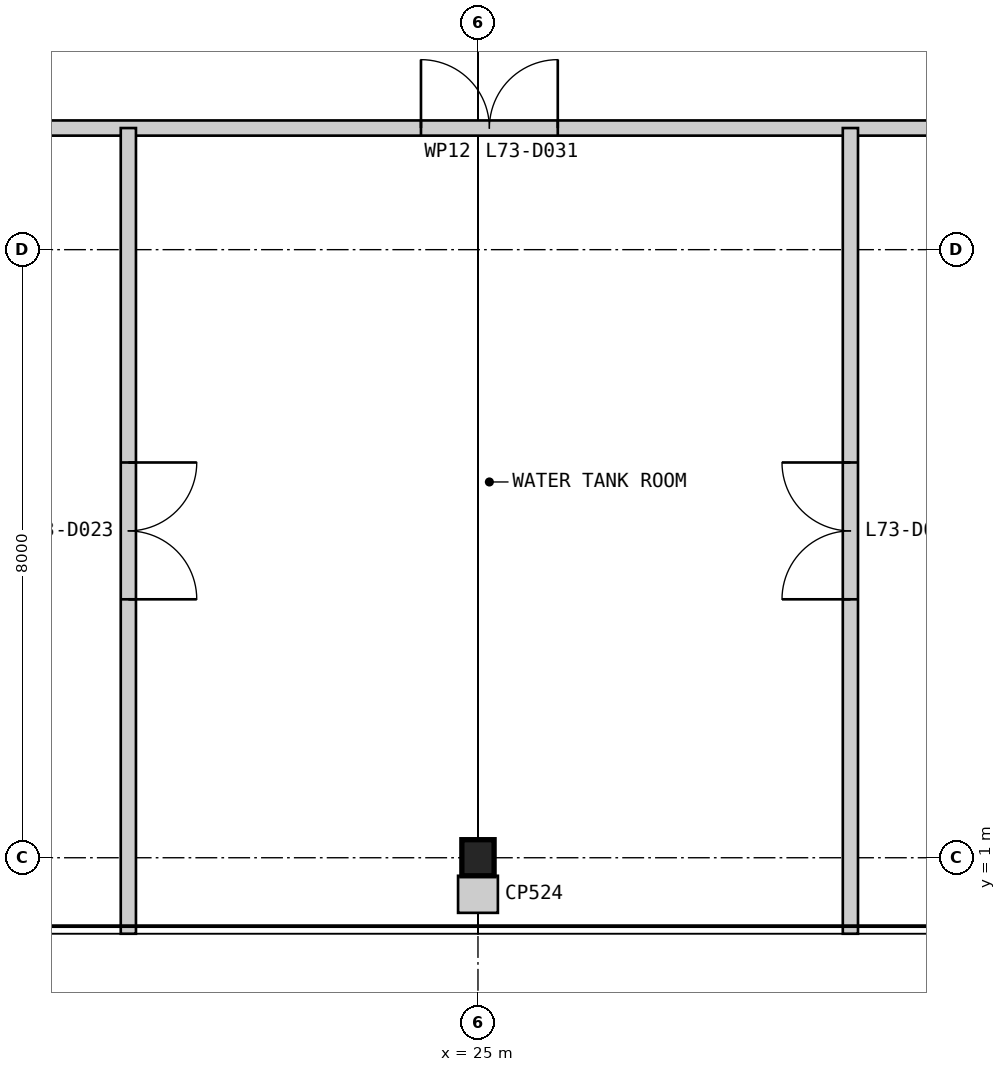
"""IFC4 building model, lengths in metres.
Left out: names, types, materials, properties, quantities, classifications, styles, units other than length and angle.
Written with IfcOpenShell. Run it as: python <this file> out.ifc"""

import sys

from ifc_helpers import new_model, si_unit, direction, frame, frame_2d, origin, origin_2d, place, context, subcontext, project, spatial, rectangle, i_section, extrude, element, fill, save


model = new_model("IFC4")
c1 = context("Model", 3, precision=1e-05, world=origin(), true_north=direction((0.0, 1.0)))
c2 = subcontext(c1, "Body", "Model", "MODEL_VIEW")
j1 = project(units=[si_unit("LENGTHUNIT", "METRE"), si_unit("PLANEANGLEUNIT", "RADIAN")], contexts=[c1])
p1 = place(None, origin())
s1 = spatial("IfcSite", under=j1, at=p1, CompositionType="ELEMENT")
p2 = place(p1, origin())
s2 = spatial("IfcBuilding", under=s1, at=p2, CompositionType="ELEMENT")
p3 = place(p2, frame((0.0, 0.0, 301.8)))
s3 = spatial("IfcBuildingStorey", under=s2, at=p3, CompositionType="ELEMENT", Elevation=301.8)
p4 = place(p3, frame((25.0, 1.0, 0.0), z_axis=(0.0, 0.0, 1.0), x_axis=(1.0, 0.0, 0.0)))
e1 = element("IfcColumn", 1, at=p4, inside=s3, PredefinedType="COLUMN", context=c2, shape_type="SweptSolid", body=[
    extrude(i_section(OverallWidth=0.424, OverallDepth=0.475, WebThickness=0.048, FlangeThickness=0.077, at=origin_2d()), origin(), (0.0, 0.0, 1.0), 6.0),
])
p5 = place(p3, frame((13.0, 10.6, 0.0), z_axis=(0.0, 0.0, 1.0), x_axis=(1.0, 0.0, 0.0)))
e2 = element("IfcWall", 2, at=p5, inside=s3, PredefinedType="PARTITIONING", context=c2, shape_type="SweptSolid", body=[
    extrude(rectangle(XDim=24.0, YDim=0.2, at=frame_2d((12.0, 0.0))), origin(), (0.0, 0.0, 1.0), 5.8),
])
p6 = place(p5, frame((2.8, 0.0, 0.0)))
e3 = element("IfcOpeningElement", 3, at=p6, cuts=e2, PredefinedType="OPENING", context=c2, shape_type="SweptSolid", body=[
    extrude(rectangle(XDim=1.8, YDim=2.4, at=frame_2d((0.9, 1.2))), frame((0.0, 0.11, 0.0), z_axis=(0.0, -1.0, 0.0), x_axis=(1.0, 0.0, 0.0)), (0.0, 0.0, 1.0), 0.22),
])
p7 = place(p5, frame((11.25, 0.0, 0.0)))
e4 = element("IfcOpeningElement", 4, at=p7, cuts=e2, PredefinedType="OPENING", context=c2, shape_type="SweptSolid", body=[
    extrude(rectangle(XDim=1.8, YDim=2.4, at=frame_2d((0.9, 1.2))), frame((0.0, 0.11, 0.0), z_axis=(0.0, -1.0, 0.0), x_axis=(1.0, 0.0, 0.0)), (0.0, 0.0, 1.0), 0.22),
])
p8 = place(p5, frame((19.55, 0.0, 0.0)))
e5 = element("IfcOpeningElement", 5, at=p8, cuts=e2, PredefinedType="OPENING", context=c2, shape_type="SweptSolid", body=[
    extrude(rectangle(XDim=1.8, YDim=2.4, at=frame_2d((0.9, 1.2))), frame((0.0, 0.11, 0.0), z_axis=(0.0, -1.0, 0.0), x_axis=(1.0, 0.0, 0.0)), (0.0, 0.0, 1.0), 0.22),
])
p9 = place(p3, frame((20.4, 0.0, 0.0), z_axis=(0.0, 0.0, 1.0), x_axis=(0.0, 1.0, 0.0)))
e6 = element("IfcWall", 6, at=p9, inside=s3, PredefinedType="PARTITIONING", context=c2, shape_type="SweptSolid", body=[
    extrude(rectangle(XDim=10.6, YDim=0.2, at=frame_2d((5.3, 0.0))), origin(), (0.0, 0.0, 1.0), 5.8),
])
p10 = place(p9, frame((4.4, 0.0, 0.0)))
e7 = element("IfcOpeningElement", 7, at=p10, cuts=e6, PredefinedType="OPENING", context=c2, shape_type="SweptSolid", body=[
    extrude(rectangle(XDim=1.8, YDim=2.4, at=frame_2d((0.9, 1.2))), frame((0.0, 0.11, 0.0), z_axis=(0.0, -1.0, 0.0), x_axis=(1.0, 0.0, 0.0)), (0.0, 0.0, 1.0), 0.22),
])
p11 = place(p3, frame((29.9, 0.0, 0.0), z_axis=(0.0, 0.0, 1.0), x_axis=(0.0, 1.0, 0.0)))
e8 = element("IfcWall", 8, at=p11, inside=s3, PredefinedType="PARTITIONING", context=c2, shape_type="SweptSolid", body=[
    extrude(rectangle(XDim=10.6, YDim=0.2, at=frame_2d((5.3, 0.0))), origin(), (0.0, 0.0, 1.0), 5.8),
])
p12 = place(p11, frame((4.4, 0.0, 0.0)))
e9 = element("IfcOpeningElement", 9, at=p12, cuts=e8, PredefinedType="OPENING", context=c2, shape_type="SweptSolid", body=[
    extrude(rectangle(XDim=1.8, YDim=2.4, at=frame_2d((0.9, 1.2))), frame((0.0, 0.11, 0.0), z_axis=(0.0, -1.0, 0.0), x_axis=(1.0, 0.0, 0.0)), (0.0, 0.0, 1.0), 0.22),
])
p13 = place(p3, frame((25.0, 0.275, 0.0), z_axis=(0.0, 0.0, 1.0), x_axis=(0.0, 1.0, 0.0)))
e10 = element("IfcWall", 10, at=p13, inside=s3, PredefinedType="PARTITIONING", context=c2, shape_type="SweptSolid", body=[
    extrude(rectangle(XDim=0.488, YDim=0.524, at=frame_2d((0.244, 0.0))), origin(), (0.0, 0.0, 1.0), 5.8),
])
p14 = place(p10, frame((1.8, 0.0, 0.0), z_axis=(0.0, 0.0, 1.0), x_axis=(-1.0, 0.0, 0.0)))
e11 = element("IfcDoor", 11, at=p14, inside=s3, OperationType="DOUBLE_DOOR_SINGLE_SWING", PredefinedType="DOOR", context=c2, shape_type="SweptSolid", body=[
    extrude(rectangle(XDim=1.8, YDim=2.4, at=frame_2d((0.9, 1.2))), frame((0.0, 0.025, 0.0), z_axis=(0.0, -1.0, 0.0), x_axis=(1.0, 0.0, 0.0)), (0.0, 0.0, 1.0), 0.05),
])
fill(e7, e11)
p15 = place(p12, origin())
e12 = element("IfcDoor", 12, at=p15, inside=s3, OperationType="DOUBLE_DOOR_SINGLE_SWING", PredefinedType="DOOR", context=c2, shape_type="SweptSolid", body=[
    extrude(rectangle(XDim=1.8, YDim=2.4, at=frame_2d((0.9, 1.2))), frame((0.0, 0.025, 0.0), z_axis=(0.0, -1.0, 0.0), x_axis=(1.0, 0.0, 0.0)), (0.0, 0.0, 1.0), 0.05),
])
fill(e9, e12)
p16 = place(p7, origin())
e13 = element("IfcDoor", 13, at=p16, inside=s3, OperationType="DOUBLE_DOOR_SINGLE_SWING", PredefinedType="DOOR", context=c2, shape_type="SweptSolid", body=[
    extrude(rectangle(XDim=1.8, YDim=2.4, at=frame_2d((0.9, 1.2))), frame((0.0, 0.025, 0.0), z_axis=(0.0, -1.0, 0.0), x_axis=(1.0, 0.0, 0.0)), (0.0, 0.0, 1.0), 0.05),
])
fill(e4, e13)
save(model, sys.argv[1])
